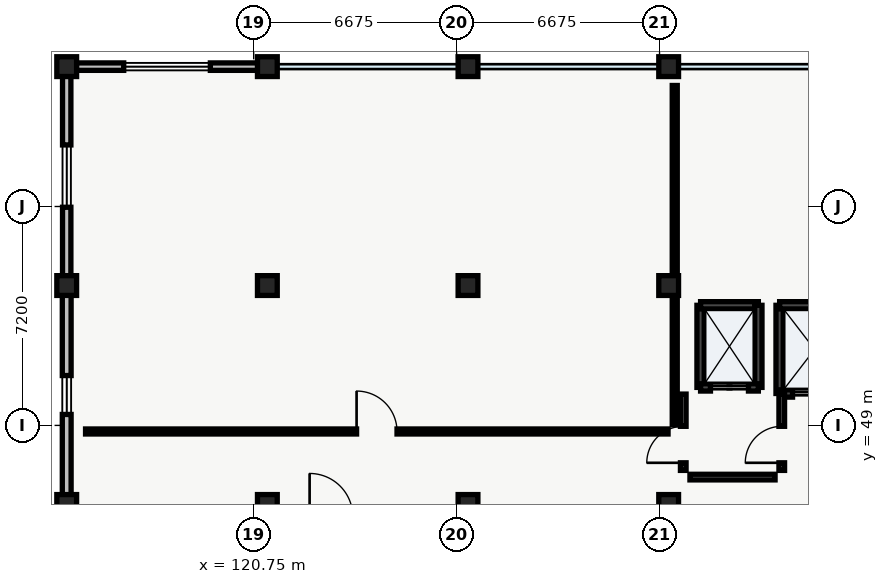
"""IFC4 building model, lengths in metres.
Left out: names, types, materials, properties, quantities, classifications, styles, units other than length and angle.
Written with IfcOpenShell. Run it as: python <this file> out.ifc"""

import sys

from ifc_helpers import new_model, si_unit, direction, frame, frame_2d, origin, origin_2d, place, context, subcontext, project, spatial, rectangle, extrude, element, fill, save


model = new_model("IFC4")
c1 = context("Model", 3, precision=1e-05, world=origin(), true_north=direction((0.0, 1.0)))
c2 = subcontext(c1, "Body", "Model", "MODEL_VIEW")
j1 = project(units=[si_unit("LENGTHUNIT", "METRE"), si_unit("PLANEANGLEUNIT", "RADIAN")], contexts=[c1])
p1 = place(None, origin())
s1 = spatial("IfcSite", under=j1, at=p1, CompositionType="ELEMENT")
p2 = place(p1, origin())
s2 = spatial("IfcBuilding", under=s1, at=p2, CompositionType="ELEMENT")
p3 = place(p2, frame((0.0, 0.0, 9.6)))
s3 = spatial("IfcBuildingStorey", under=s2, at=p3, CompositionType="ELEMENT", Elevation=9.6)
for number, where, z_axis, x_axis in (
    (1, (114.6, 46.4, 0.0), (0.0, 0.0, 1.0), (1.0, 0.0, 0.0)),
    (2, (114.6, 53.6, 0.0), (0.0, 0.0, 1.0), (1.0, 0.0, 0.0)),
    (3, (114.6, 60.8, 0.0), (0.0, 0.0, 1.0), (1.0, 0.0, 0.0)),
    (4, (121.2, 46.4, 0.0), (0.0, 0.0, 1.0), (1.0, 0.0, 0.0)),
    (5, (121.2, 53.6, 0.0), (0.0, 0.0, 1.0), (1.0, 0.0, 0.0)),
    (6, (121.2, 60.8, 0.0), (0.0, 0.0, 1.0), (1.0, 0.0, 0.0)),
    (7, (127.8, 46.4, 0.0), (0.0, 0.0, 1.0), (1.0, 0.0, 0.0)),
    (8, (127.8, 53.6, 0.0), (0.0, 0.0, 1.0), (1.0, 0.0, 0.0)),
    (9, (127.8, 60.8, 0.0), (0.0, 0.0, 1.0), (1.0, 0.0, 0.0)),
    (10, (134.4, 46.4, 0.0), (0.0, 0.0, 1.0), (1.0, 0.0, 0.0)),
    (11, (134.4, 53.6, 0.0), (0.0, 0.0, 1.0), (1.0, 0.0, 0.0)),
    (12, (134.4, 60.8, 0.0), (0.0, 0.0, 1.0), (1.0, 0.0, 0.0)),
):
    element("IfcColumn", number, at=place(p3, frame(where, z_axis=z_axis, x_axis=x_axis)), inside=s3, PredefinedType="COLUMN", context=c2, shape_type="SweptSolid", body=[
        extrude(rectangle(XDim=0.65, YDim=0.65, at=origin_2d()), origin(), (0.0, 0.0, 1.0), 4.3),
    ])
p4 = place(p3, frame((114.6, 46.72, 0.0), z_axis=(0.0, 0.0, 1.0), x_axis=(0.0, 1.0, 0.0)))
e13 = element("IfcWall", 13, at=p4, inside=s3, PredefinedType="STANDARD", context=c2, shape_type="SweptSolid", body=[
    extrude(rectangle(XDim=6.56, YDim=0.29, at=frame_2d((3.28, 0.0))), origin(), (0.0, 0.0, 1.0), 3.835),
])
p5 = place(p4, frame((2.64, 0.0, 0.95)))
e14 = element("IfcOpeningElement", 14, at=p5, cuts=e13, PredefinedType="OPENING", context=c2, shape_type="SweptSolid", body=[
    extrude(rectangle(XDim=1.28, YDim=1.42, at=frame_2d((0.64, 0.71))), frame((0.0, 0.145, 0.0), z_axis=(0.0, -1.0, 0.0), x_axis=(1.0, 0.0, 0.0)), (0.0, 0.0, 1.0), 0.29),
])
p6 = place(p3, frame((114.6, 53.92, 0.0), z_axis=(0.0, 0.0, 1.0), x_axis=(0.0, 1.0, 0.0)))
e15 = element("IfcWall", 15, at=p6, inside=s3, PredefinedType="STANDARD", context=c2, shape_type="SweptSolid", body=[
    extrude(rectangle(XDim=6.56, YDim=0.275, at=frame_2d((3.28, 0.0))), origin(), (0.0, 0.0, 1.0), 3.835),
])
p7 = place(p6, frame((2.255, 0.0, 0.95)))
e16 = element("IfcOpeningElement", 16, at=p7, cuts=e15, PredefinedType="OPENING", context=c2, shape_type="SweptSolid", body=[
    extrude(rectangle(XDim=2.05, YDim=1.7, at=frame_2d((1.025, 0.85))), frame((0.0, 0.137, 0.0), z_axis=(0.0, -1.0, 0.0), x_axis=(1.0, 0.0, 0.0)), (0.0, 0.0, 1.0), 0.275),
])
p8 = place(p3, frame((114.92, 60.8, 0.0), z_axis=(0.0, 0.0, 1.0), x_axis=(1.0, 0.0, 0.0)))
e17 = element("IfcWall", 17, at=p8, inside=s3, PredefinedType="STANDARD", context=c2, shape_type="SweptSolid", body=[
    extrude(rectangle(XDim=5.96, YDim=0.245, at=frame_2d((2.98, 0.0))), origin(), (0.0, 0.0, 1.0), 3.835),
])
p9 = place(p8, frame((1.555, 0.0, 0.95)))
e18 = element("IfcOpeningElement", 18, at=p9, cuts=e17, PredefinedType="OPENING", context=c2, shape_type="SweptSolid", body=[
    extrude(rectangle(XDim=2.85, YDim=1.5, at=frame_2d((1.425, 0.75))), frame((0.0, 0.123, 0.0), z_axis=(0.0, -1.0, 0.0), x_axis=(1.0, 0.0, 0.0)), (0.0, 0.0, 1.0), 0.245),
])
p10 = place(p3, frame((135.45, 50.25, 0.0), z_axis=(0.0, 0.0, 1.0), x_axis=(0.0, 1.0, 0.0)))
e19 = element("IfcWall", 19, at=p10, inside=s3, PredefinedType="SHEAR", context=c2, shape_type="SweptSolid", body=[
    extrude(rectangle(XDim=2.7, YDim=0.24, at=frame_2d((1.35, 0.0))), origin(), (0.0, 0.0, 1.0), 4.28),
])
p11 = place(p3, frame((135.45, 52.95, 0.0), z_axis=(0.0, 0.0, 1.0), x_axis=(1.0, 0.0, 0.0)))
e20 = element("IfcWall", 20, at=p11, inside=s3, PredefinedType="SHEAR", context=c2, shape_type="SweptSolid", body=[
    extrude(rectangle(XDim=1.9, YDim=0.24, at=frame_2d((0.95, 0.0))), origin(), (0.0, 0.0, 1.0), 4.28),
])
p12 = place(p3, frame((137.35, 52.95, 0.0), z_axis=(0.0, 0.0, 1.0), x_axis=(0.0, -1.0, 0.0)))
e21 = element("IfcWall", 21, at=p12, inside=s3, PredefinedType="SHEAR", context=c2, shape_type="SweptSolid", body=[
    extrude(rectangle(XDim=2.7, YDim=0.24, at=frame_2d((1.35, 0.0))), origin(), (0.0, 0.0, 1.0), 4.28),
])
p13 = place(p3, frame((137.35, 50.25, 0.0), z_axis=(0.0, 0.0, 1.0), x_axis=(-1.0, 0.0, 0.0)))
e22 = element("IfcWall", 22, at=p13, inside=s3, PredefinedType="SHEAR", context=c2, shape_type="SweptSolid", body=[
    extrude(rectangle(XDim=1.9, YDim=0.24, at=frame_2d((0.95, 0.0))), origin(), (0.0, 0.0, 1.0), 4.28),
])
p14 = place(p13, frame((0.325, 0.0, 0.0)))
e23 = element("IfcOpeningElement", 23, at=p14, cuts=e22, PredefinedType="OPENING", context=c2, shape_type="SweptSolid", body=[
    extrude(rectangle(XDim=1.25, YDim=2.2, at=frame_2d((0.625, 1.1))), frame((0.0, 0.12, 0.0), z_axis=(0.0, -1.0, 0.0), x_axis=(1.0, 0.0, 0.0)), (0.0, 0.0, 1.0), 0.24),
])
p15 = place(p3, frame((138.05, 50.05, 0.0), z_axis=(0.0, 0.0, 1.0), x_axis=(0.0, 1.0, 0.0)))
e24 = element("IfcWall", 24, at=p15, inside=s3, PredefinedType="SHEAR", context=c2, shape_type="SweptSolid", body=[
    extrude(rectangle(XDim=2.9, YDim=0.24, at=frame_2d((1.45, 0.0))), origin(), (0.0, 0.0, 1.0), 4.28),
])
p16 = place(p3, frame((138.05, 52.95, 0.0), z_axis=(0.0, 0.0, 1.0), x_axis=(1.0, 0.0, 0.0)))
e25 = element("IfcWall", 25, at=p16, inside=s3, PredefinedType="SHEAR", context=c2, shape_type="SweptSolid", body=[
    extrude(rectangle(XDim=2.3, YDim=0.24, at=frame_2d((1.15, 0.0))), origin(), (0.0, 0.0, 1.0), 4.28),
])
p17 = place(p3, frame((140.35, 50.05, 0.0), z_axis=(0.0, 0.0, 1.0), x_axis=(-1.0, 0.0, 0.0)))
e26 = element("IfcWall", 26, at=p17, inside=s3, PredefinedType="SHEAR", context=c2, shape_type="SweptSolid", body=[
    extrude(rectangle(XDim=2.3, YDim=0.24, at=frame_2d((1.15, 0.0))), origin(), (0.0, 0.0, 1.0), 4.28),
])
p18 = place(p17, frame((0.425, 0.0, 0.0)))
e27 = element("IfcOpeningElement", 27, at=p18, cuts=e26, PredefinedType="OPENING", context=c2, shape_type="SweptSolid", body=[
    extrude(rectangle(XDim=1.45, YDim=2.3, at=frame_2d((0.725, 1.15))), frame((0.0, 0.12, 0.0), z_axis=(0.0, -1.0, 0.0), x_axis=(1.0, 0.0, 0.0)), (0.0, 0.0, 1.0), 0.24),
])
p19 = place(p3, frame((135.1, 47.3, 0.0), z_axis=(0.0, 0.0, 1.0), x_axis=(1.0, 0.0, 0.0)))
e28 = element("IfcWall", 28, at=p19, inside=s3, PredefinedType="SOLIDWALL", context=c2, shape_type="SweptSolid", body=[
    extrude(rectangle(XDim=2.8, YDim=0.185, at=frame_2d((1.4, 0.0))), origin(), (0.0, 0.0, 1.0), 3.95),
])
p20 = place(p3, frame((138.12, 47.52, 0.0), z_axis=(0.0, 0.0, 1.0), x_axis=(0.0, 1.0, 0.0)))
e29 = element("IfcWall", 29, at=p20, inside=s3, PredefinedType="SOLIDWALL", context=c2, shape_type="SweptSolid", body=[
    extrude(rectangle(XDim=2.51, YDim=0.185, at=frame_2d((1.255, 0.0))), origin(), (0.0, 0.0, 1.0), 3.95),
])
p21 = place(p20, frame((0.25, 0.0, 0.0)))
e30 = element("IfcOpeningElement", 30, at=p21, cuts=e29, PredefinedType="OPENING", context=c2, shape_type="SweptSolid", body=[
    extrude(rectangle(XDim=1.2, YDim=2.15, at=frame_2d((0.6, 1.075))), frame((0.0, 0.093, 0.0), z_axis=(0.0, -1.0, 0.0), x_axis=(1.0, 0.0, 0.0)), (0.0, 0.0, 1.0), 0.185),
])
p22 = place(p3, frame((134.88, 50.03, 0.0), z_axis=(0.0, 0.0, 1.0), x_axis=(0.0, -1.0, 0.0)))
e31 = element("IfcWall", 31, at=p22, inside=s3, PredefinedType="SOLIDWALL", context=c2, shape_type="SweptSolid", body=[
    extrude(rectangle(XDim=2.51, YDim=0.185, at=frame_2d((1.255, 0.0))), origin(), (0.0, 0.0, 1.0), 3.95),
])
p23 = place(p22, frame((1.06, 0.0, 0.0)))
e32 = element("IfcOpeningElement", 32, at=p23, cuts=e31, PredefinedType="OPENING", context=c2, shape_type="SweptSolid", body=[
    extrude(rectangle(XDim=1.2, YDim=2.15, at=frame_2d((0.6, 1.075))), frame((0.0, 0.093, 0.0), z_axis=(0.0, -1.0, 0.0), x_axis=(1.0, 0.0, 0.0)), (0.0, 0.0, 1.0), 0.185),
])
p24 = place(p3, frame((115.22, 48.8, 0.0), z_axis=(0.0, 0.0, 1.0), x_axis=(1.0, 0.0, 0.0)))
e33 = element("IfcWall", 33, at=p24, inside=s3, PredefinedType="PARTITIONING", context=c2, shape_type="SweptSolid", body=[
    extrude(rectangle(XDim=19.16, YDim=0.165, at=frame_2d((9.58, 0.0))), origin(), (0.0, 0.0, 1.0), 3.835),
])
p25 = place(p24, frame((8.915, 0.0, 0.0)))
e34 = element("IfcOpeningElement", 34, at=p25, cuts=e33, PredefinedType="OPENING", context=c2, shape_type="SweptSolid", body=[
    extrude(rectangle(XDim=1.33, YDim=2.12, at=frame_2d((0.665, 1.06))), frame((0.0, 0.083, 0.0), z_axis=(0.0, -1.0, 0.0), x_axis=(1.0, 0.0, 0.0)), (0.0, 0.0, 1.0), 0.165),
])
p26 = place(p3, frame((134.6, 49.02, 0.0), z_axis=(0.0, 0.0, 1.0), x_axis=(0.0, 1.0, 0.0)))
e35 = element("IfcWall", 35, at=p26, inside=s3, PredefinedType="PARTITIONING", context=c2, shape_type="SweptSolid", body=[
    extrude(rectangle(XDim=11.16, YDim=0.165, at=frame_2d((5.58, 0.0))), origin(), (0.0, 0.0, 1.0), 3.635),
])
p27 = place(p5, origin())
e36 = element("IfcWindow", 36, at=p27, inside=s3, PartitioningType="SINGLE_PANEL", PredefinedType="WINDOW", context=c2, shape_type="SweptSolid", body=[
    extrude(rectangle(XDim=1.28, YDim=1.42, at=frame_2d((0.64, 0.71))), frame((0.0, 0.03, 0.0), z_axis=(0.0, -1.0, 0.0), x_axis=(1.0, 0.0, 0.0)), (0.0, 0.0, 1.0), 0.06),
])
fill(e14, e36)
p28 = place(p7, origin())
e37 = element("IfcWindow", 37, at=p28, inside=s3, PartitioningType="SINGLE_PANEL", PredefinedType="WINDOW", context=c2, shape_type="SweptSolid", body=[
    extrude(rectangle(XDim=2.05, YDim=1.7, at=frame_2d((1.025, 0.85))), frame((0.0, 0.03, 0.0), z_axis=(0.0, -1.0, 0.0), x_axis=(1.0, 0.0, 0.0)), (0.0, 0.0, 1.0), 0.06),
])
fill(e16, e37)
p29 = place(p9, origin())
e38 = element("IfcWindow", 38, at=p29, inside=s3, PartitioningType="SINGLE_PANEL", PredefinedType="WINDOW", context=c2, shape_type="SweptSolid", body=[
    extrude(rectangle(XDim=2.85, YDim=1.5, at=frame_2d((1.425, 0.75))), frame((0.0, 0.03, 0.0), z_axis=(0.0, -1.0, 0.0), x_axis=(1.0, 0.0, 0.0)), (0.0, 0.0, 1.0), 0.06),
])
fill(e18, e38)
p30 = place(p14, origin())
e39 = element("IfcDoor", 39, at=p30, inside=s3, OperationType="SLIDING_TO_RIGHT", PredefinedType="DOOR", context=c2, shape_type="SweptSolid", body=[
    extrude(rectangle(XDim=1.25, YDim=2.2, at=frame_2d((0.625, 1.1))), frame((0.0, 0.025, 0.0), z_axis=(0.0, -1.0, 0.0), x_axis=(1.0, 0.0, 0.0)), (0.0, 0.0, 1.0), 0.05),
])
fill(e23, e39)
p31 = place(p18, origin())
e40 = element("IfcDoor", 40, at=p31, inside=s3, OperationType="DOUBLE_DOOR_SLIDING", PredefinedType="DOOR", context=c2, shape_type="SweptSolid", body=[
    extrude(rectangle(XDim=1.45, YDim=2.3, at=frame_2d((0.725, 1.15))), frame((0.0, 0.025, 0.0), z_axis=(0.0, -1.0, 0.0), x_axis=(1.0, 0.0, 0.0)), (0.0, 0.0, 1.0), 0.05),
])
fill(e27, e40)
p32 = place(p21, origin())
e41 = element("IfcDoor", 41, at=p32, inside=s3, OperationType="SINGLE_SWING_LEFT", PredefinedType="DOOR", context=c2, shape_type="SweptSolid", body=[
    extrude(rectangle(XDim=1.2, YDim=2.15, at=frame_2d((0.6, 1.075))), frame((0.0, 0.025, 0.0), z_axis=(0.0, -1.0, 0.0), x_axis=(1.0, 0.0, 0.0)), (0.0, 0.0, 1.0), 0.05),
])
fill(e30, e41)
p33 = place(p23, origin())
e42 = element("IfcDoor", 42, at=p33, inside=s3, OperationType="SINGLE_SWING_RIGHT", PredefinedType="DOOR", context=c2, shape_type="SweptSolid", body=[
    extrude(rectangle(XDim=1.2, YDim=2.15, at=frame_2d((0.6, 1.075))), frame((0.0, 0.025, 0.0), z_axis=(0.0, -1.0, 0.0), x_axis=(1.0, 0.0, 0.0)), (0.0, 0.0, 1.0), 0.05),
])
fill(e32, e42)
p34 = place(p25, origin())
e43 = element("IfcDoor", 43, at=p34, inside=s3, OperationType="SINGLE_SWING_LEFT", PredefinedType="DOOR", context=c2, shape_type="SweptSolid", body=[
    extrude(rectangle(XDim=1.33, YDim=2.12, at=frame_2d((0.665, 1.06))), frame((0.0, 0.025, 0.0), z_axis=(0.0, -1.0, 0.0), x_axis=(1.0, 0.0, 0.0)), (0.0, 0.0, 1.0), 0.05),
])
fill(e34, e43)
save(model, sys.argv[1])
